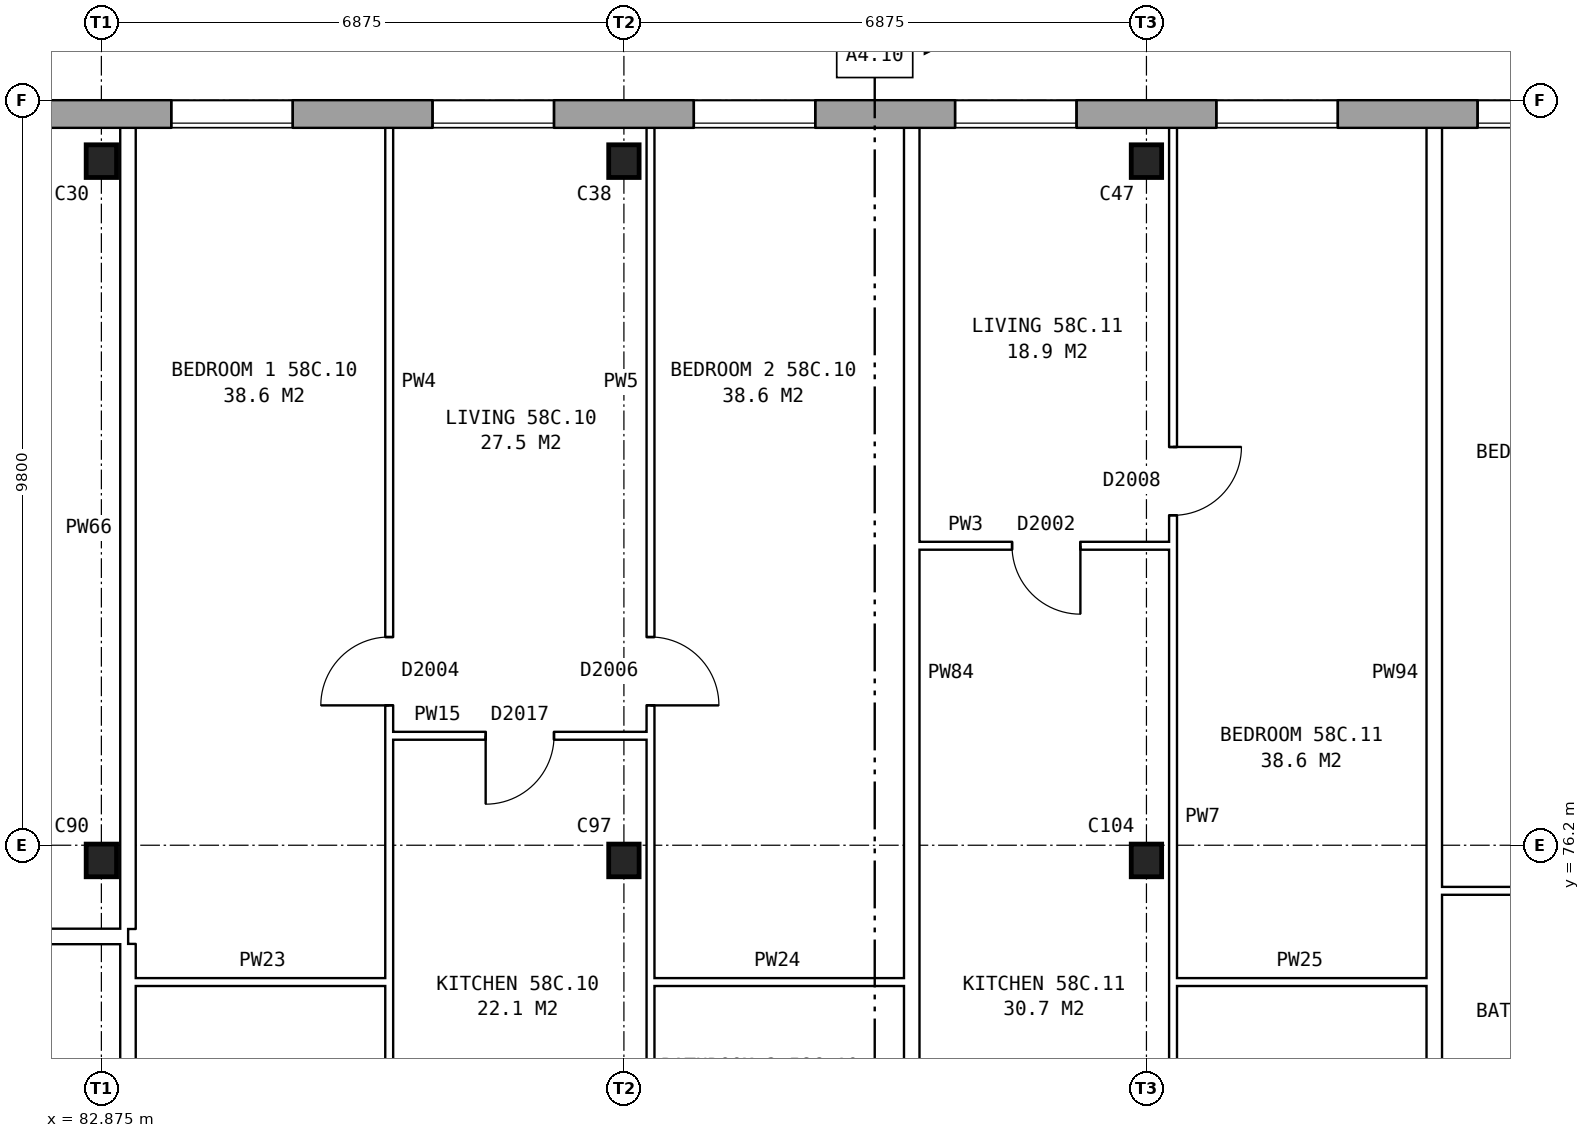
"""IFC4 building model, lengths in metres.
Left out: names, types, materials, properties, quantities, classifications, styles, units other than length and angle.
Written with IfcOpenShell. Run it as: python <this file> out.ifc"""

import sys

from ifc_helpers import new_model, si_unit, direction, frame, frame_2d, origin, origin_2d, place, context, subcontext, project, spatial, rectangle, i_section, extrude, element, fill, save


model = new_model("IFC4")
c1 = context("Model", 3, precision=1e-05, world=origin(), true_north=direction((0.0, 1.0)))
c2 = subcontext(c1, "Body", "Model", "MODEL_VIEW")
j1 = project(units=[si_unit("LENGTHUNIT", "METRE"), si_unit("PLANEANGLEUNIT", "RADIAN")], contexts=[c1])
p1 = place(None, origin())
s1 = spatial("IfcSite", under=j1, at=p1, CompositionType="ELEMENT")
p2 = place(p1, origin())
s2 = spatial("IfcBuilding", under=s1, at=p2, CompositionType="ELEMENT")
p3 = place(p2, frame((0.0, 0.0, 205.9)))
s3 = spatial("IfcBuildingStorey", under=s2, at=p3, CompositionType="ELEMENT", Elevation=205.9)
for number, where, z_axis, x_axis in (
    (1, (82.875, 76.0, 0.0), (0.0, 0.0, 1.0), (1.0, 0.0, 0.0)),
    (2, (89.75, 76.0, 0.0), (0.0, 0.0, 1.0), (1.0, 0.0, 0.0)),
    (3, (96.625, 76.0, 0.0), (0.0, 0.0, 1.0), (1.0, 0.0, 0.0)),
    (4, (82.875, 85.2, 0.0), (0.0, 0.0, 1.0), (1.0, 0.0, 0.0)),
    (5, (89.75, 85.2, 0.0), (0.0, 0.0, 1.0), (1.0, 0.0, 0.0)),
    (6, (96.625, 85.2, 0.0), (0.0, 0.0, 1.0), (1.0, 0.0, 0.0)),
):
    element("IfcColumn", number, at=place(p3, frame(where, z_axis=z_axis, x_axis=x_axis)), inside=s3, PredefinedType="COLUMN", context=c2, shape_type="SweptSolid", body=[
        extrude(i_section(OverallWidth=0.4, OverallDepth=0.43, WebThickness=0.04, FlangeThickness=0.04, at=origin_2d()), origin(), (0.0, 0.0, 1.0), 2.85),
    ])
p4 = place(p3, frame((131.05, 85.82, 0.0), z_axis=(0.0, 0.0, 1.0), x_axis=(-1.0, 0.0, 0.0)))
e7 = element("IfcWall", 7, at=p4, inside=s3, PredefinedType="STANDARD", context=c2, shape_type="SweptSolid", body=[
    extrude(rectangle(XDim=55.1, YDim=0.36, at=frame_2d((27.55, 0.0))), origin(), (0.0, 0.0, 1.0), 2.85),
])
p5 = place(p4, frame((0.969, 0.0, 0.8)))
e8 = element("IfcOpeningElement", 8, at=p5, cuts=e7, PredefinedType="OPENING", context=c2, shape_type="SweptSolid", body=[
    extrude(rectangle(XDim=1.6, YDim=1.8, at=frame_2d((0.8, 0.9))), frame((0.0, 0.19, 0.0), z_axis=(0.0, -1.0, 0.0), x_axis=(1.0, 0.0, 0.0)), (0.0, 0.0, 1.0), 0.38),
])
p6 = place(p4, frame((4.406, 0.0, 0.8)))
e9 = element("IfcOpeningElement", 9, at=p6, cuts=e7, PredefinedType="OPENING", context=c2, shape_type="SweptSolid", body=[
    extrude(rectangle(XDim=1.6, YDim=1.8, at=frame_2d((0.8, 0.9))), frame((0.0, 0.19, 0.0), z_axis=(0.0, -1.0, 0.0), x_axis=(1.0, 0.0, 0.0)), (0.0, 0.0, 1.0), 0.38),
])
p7 = place(p4, frame((7.844, 0.0, 0.8)))
e10 = element("IfcOpeningElement", 10, at=p7, cuts=e7, PredefinedType="OPENING", context=c2, shape_type="SweptSolid", body=[
    extrude(rectangle(XDim=1.6, YDim=1.8, at=frame_2d((0.8, 0.9))), frame((0.0, 0.19, 0.0), z_axis=(0.0, -1.0, 0.0), x_axis=(1.0, 0.0, 0.0)), (0.0, 0.0, 1.0), 0.38),
])
p8 = place(p4, frame((11.281, 0.0, 0.8)))
e11 = element("IfcOpeningElement", 11, at=p8, cuts=e7, PredefinedType="OPENING", context=c2, shape_type="SweptSolid", body=[
    extrude(rectangle(XDim=1.6, YDim=1.8, at=frame_2d((0.8, 0.9))), frame((0.0, 0.19, 0.0), z_axis=(0.0, -1.0, 0.0), x_axis=(1.0, 0.0, 0.0)), (0.0, 0.0, 1.0), 0.38),
])
p9 = place(p4, frame((14.719, 0.0, 0.8)))
e12 = element("IfcOpeningElement", 12, at=p9, cuts=e7, PredefinedType="OPENING", context=c2, shape_type="SweptSolid", body=[
    extrude(rectangle(XDim=1.6, YDim=1.8, at=frame_2d((0.8, 0.9))), frame((0.0, 0.19, 0.0), z_axis=(0.0, -1.0, 0.0), x_axis=(1.0, 0.0, 0.0)), (0.0, 0.0, 1.0), 0.38),
])
p10 = place(p4, frame((18.156, 0.0, 0.8)))
e13 = element("IfcOpeningElement", 13, at=p10, cuts=e7, PredefinedType="OPENING", context=c2, shape_type="SweptSolid", body=[
    extrude(rectangle(XDim=1.6, YDim=1.8, at=frame_2d((0.8, 0.9))), frame((0.0, 0.19, 0.0), z_axis=(0.0, -1.0, 0.0), x_axis=(1.0, 0.0, 0.0)), (0.0, 0.0, 1.0), 0.38),
])
p11 = place(p4, frame((21.594, 0.0, 0.8)))
e14 = element("IfcOpeningElement", 14, at=p11, cuts=e7, PredefinedType="OPENING", context=c2, shape_type="SweptSolid", body=[
    extrude(rectangle(XDim=1.6, YDim=1.8, at=frame_2d((0.8, 0.9))), frame((0.0, 0.19, 0.0), z_axis=(0.0, -1.0, 0.0), x_axis=(1.0, 0.0, 0.0)), (0.0, 0.0, 1.0), 0.38),
])
p12 = place(p4, frame((25.031, 0.0, 0.8)))
e15 = element("IfcOpeningElement", 15, at=p12, cuts=e7, PredefinedType="OPENING", context=c2, shape_type="SweptSolid", body=[
    extrude(rectangle(XDim=1.6, YDim=1.8, at=frame_2d((0.8, 0.9))), frame((0.0, 0.19, 0.0), z_axis=(0.0, -1.0, 0.0), x_axis=(1.0, 0.0, 0.0)), (0.0, 0.0, 1.0), 0.38),
])
p13 = place(p4, frame((28.469, 0.0, 0.8)))
e16 = element("IfcOpeningElement", 16, at=p13, cuts=e7, PredefinedType="OPENING", context=c2, shape_type="SweptSolid", body=[
    extrude(rectangle(XDim=1.6, YDim=1.8, at=frame_2d((0.8, 0.9))), frame((0.0, 0.19, 0.0), z_axis=(0.0, -1.0, 0.0), x_axis=(1.0, 0.0, 0.0)), (0.0, 0.0, 1.0), 0.38),
])
p14 = place(p4, frame((31.906, 0.0, 0.8)))
e17 = element("IfcOpeningElement", 17, at=p14, cuts=e7, PredefinedType="OPENING", context=c2, shape_type="SweptSolid", body=[
    extrude(rectangle(XDim=1.6, YDim=1.8, at=frame_2d((0.8, 0.9))), frame((0.0, 0.19, 0.0), z_axis=(0.0, -1.0, 0.0), x_axis=(1.0, 0.0, 0.0)), (0.0, 0.0, 1.0), 0.38),
])
p15 = place(p4, frame((35.344, 0.0, 0.8)))
e18 = element("IfcOpeningElement", 18, at=p15, cuts=e7, PredefinedType="OPENING", context=c2, shape_type="SweptSolid", body=[
    extrude(rectangle(XDim=1.6, YDim=1.8, at=frame_2d((0.8, 0.9))), frame((0.0, 0.19, 0.0), z_axis=(0.0, -1.0, 0.0), x_axis=(1.0, 0.0, 0.0)), (0.0, 0.0, 1.0), 0.38),
])
p16 = place(p4, frame((38.781, 0.0, 0.8)))
e19 = element("IfcOpeningElement", 19, at=p16, cuts=e7, PredefinedType="OPENING", context=c2, shape_type="SweptSolid", body=[
    extrude(rectangle(XDim=1.6, YDim=1.8, at=frame_2d((0.8, 0.9))), frame((0.0, 0.19, 0.0), z_axis=(0.0, -1.0, 0.0), x_axis=(1.0, 0.0, 0.0)), (0.0, 0.0, 1.0), 0.38),
])
p17 = place(p4, frame((42.219, 0.0, 0.8)))
e20 = element("IfcOpeningElement", 20, at=p17, cuts=e7, PredefinedType="OPENING", context=c2, shape_type="SweptSolid", body=[
    extrude(rectangle(XDim=1.6, YDim=1.8, at=frame_2d((0.8, 0.9))), frame((0.0, 0.19, 0.0), z_axis=(0.0, -1.0, 0.0), x_axis=(1.0, 0.0, 0.0)), (0.0, 0.0, 1.0), 0.38),
])
p18 = place(p4, frame((45.656, 0.0, 0.8)))
e21 = element("IfcOpeningElement", 21, at=p18, cuts=e7, PredefinedType="OPENING", context=c2, shape_type="SweptSolid", body=[
    extrude(rectangle(XDim=1.6, YDim=1.8, at=frame_2d((0.8, 0.9))), frame((0.0, 0.19, 0.0), z_axis=(0.0, -1.0, 0.0), x_axis=(1.0, 0.0, 0.0)), (0.0, 0.0, 1.0), 0.38),
])
p19 = place(p4, frame((49.094, 0.0, 0.8)))
e22 = element("IfcOpeningElement", 22, at=p19, cuts=e7, PredefinedType="OPENING", context=c2, shape_type="SweptSolid", body=[
    extrude(rectangle(XDim=1.6, YDim=1.8, at=frame_2d((0.8, 0.9))), frame((0.0, 0.19, 0.0), z_axis=(0.0, -1.0, 0.0), x_axis=(1.0, 0.0, 0.0)), (0.0, 0.0, 1.0), 0.38),
])
p20 = place(p4, frame((52.531, 0.0, 0.8)))
e23 = element("IfcOpeningElement", 23, at=p20, cuts=e7, PredefinedType="OPENING", context=c2, shape_type="SweptSolid", body=[
    extrude(rectangle(XDim=1.6, YDim=1.8, at=frame_2d((0.8, 0.9))), frame((0.0, 0.19, 0.0), z_axis=(0.0, -1.0, 0.0), x_axis=(1.0, 0.0, 0.0)), (0.0, 0.0, 1.0), 0.38),
])
p21 = place(p3, frame((83.325, 74.4, 0.0), z_axis=(0.0, 0.0, 1.0), x_axis=(1.0, 0.0, 0.0)))
e24 = element("IfcWall", 24, at=p21, inside=s3, PredefinedType="PARTITIONING", context=c2, shape_type="SweptSolid", body=[
    extrude(rectangle(XDim=3.337, YDim=0.1, at=frame_2d((1.668, 0.0))), origin(), (0.0, 0.0, 1.0), 2.85),
])
for number, where, z_axis, x_axis in (
    (25, (90.1, 74.4, 0.0), (0.0, 0.0, 1.0), (1.0, 0.0, 0.0)),
    (26, (96.975, 74.4, 0.0), (0.0, 0.0, 1.0), (1.0, 0.0, 0.0)),
):
    element("IfcWall", number, at=place(p3, frame(where, z_axis=z_axis, x_axis=x_axis)), inside=s3, PredefinedType="PARTITIONING", context=c2, shape_type="SweptSolid", body=[
        extrude(rectangle(XDim=3.337, YDim=0.1, at=frame_2d((1.668, 0.0))), origin(), (0.0, 0.0, 1.0), 2.85),
    ])
p22 = place(p3, frame((75.64, 75.0, 0.0), z_axis=(0.0, 0.0, 1.0), x_axis=(1.0, 0.0, 0.0)))
e27 = element("IfcWall", 27, at=p22, inside=s3, PredefinedType="PARTITIONING", context=c2, shape_type="SweptSolid", body=[
    extrude(rectangle(XDim=7.585, YDim=0.2, at=frame_2d((3.792, 0.0))), origin(), (0.0, 0.0, 1.0), 2.85),
])
p23 = place(p22, frame((3.343, 0.0, 0.0)))
e28 = element("IfcOpeningElement", 28, at=p23, cuts=e27, PredefinedType="OPENING", context=c2, shape_type="SweptSolid", body=[
    extrude(rectangle(XDim=0.9, YDim=2.1, at=frame_2d((0.45, 1.05))), frame((0.0, 0.11, 0.0), z_axis=(0.0, -1.0, 0.0), x_axis=(1.0, 0.0, 0.0)), (0.0, 0.0, 1.0), 0.22),
])
p24 = place(p3, frame((100.512, 75.6, 0.0), z_axis=(0.0, 0.0, 1.0), x_axis=(1.0, 0.0, 0.0)))
e29 = element("IfcWall", 29, at=p24, inside=s3, PredefinedType="PARTITIONING", context=c2, shape_type="SweptSolid", body=[
    extrude(rectangle(XDim=3.338, YDim=0.1, at=frame_2d((1.669, 0.0))), origin(), (0.0, 0.0, 1.0), 2.85),
])
p25 = place(p3, frame((86.662, 77.64, 0.0), z_axis=(0.0, 0.0, 1.0), x_axis=(1.0, 0.0, 0.0)))
e30 = element("IfcWall", 30, at=p25, inside=s3, PredefinedType="PARTITIONING", context=c2, shape_type="SweptSolid", body=[
    extrude(rectangle(XDim=3.438, YDim=0.1, at=frame_2d((1.719, 0.0))), origin(), (0.0, 0.0, 1.0), 2.85),
])
p26 = place(p25, frame((1.269, 0.0, 0.0)))
e31 = element("IfcOpeningElement", 31, at=p26, cuts=e30, PredefinedType="OPENING", context=c2, shape_type="SweptSolid", body=[
    extrude(rectangle(XDim=0.9, YDim=2.1, at=frame_2d((0.45, 1.05))), frame((0.0, 0.06, 0.0), z_axis=(0.0, -1.0, 0.0), x_axis=(1.0, 0.0, 0.0)), (0.0, 0.0, 1.0), 0.12),
])
p27 = place(p3, frame((93.637, 80.14, 0.0), z_axis=(0.0, 0.0, 1.0), x_axis=(1.0, 0.0, 0.0)))
e32 = element("IfcWall", 32, at=p27, inside=s3, PredefinedType="PARTITIONING", context=c2, shape_type="SweptSolid", body=[
    extrude(rectangle(XDim=3.338, YDim=0.1, at=frame_2d((1.669, 0.0))), origin(), (0.0, 0.0, 1.0), 2.85),
])
p28 = place(p27, frame((1.219, 0.0, 0.0)))
e33 = element("IfcOpeningElement", 33, at=p28, cuts=e32, PredefinedType="OPENING", context=c2, shape_type="SweptSolid", body=[
    extrude(rectangle(XDim=0.9, YDim=2.1, at=frame_2d((0.45, 1.05))), frame((0.0, 0.06, 0.0), z_axis=(0.0, -1.0, 0.0), x_axis=(1.0, 0.0, 0.0)), (0.0, 0.0, 1.0), 0.12),
])
p29 = place(p3, frame((83.225, 71.3, 0.0), z_axis=(0.0, 0.0, 1.0), x_axis=(0.0, 1.0, 0.0)))
e34 = element("IfcWall", 34, at=p29, inside=s3, PredefinedType="PARTITIONING", context=c2, shape_type="SweptSolid", body=[
    extrude(rectangle(XDim=3.6, YDim=0.2, at=frame_2d((1.8, 0.0))), origin(), (0.0, 0.0, 1.0), 2.85),
])
p30 = place(p3, frame((83.225, 75.1, 0.0), z_axis=(0.0, 0.0, 1.0), x_axis=(0.0, 1.0, 0.0)))
e35 = element("IfcWall", 35, at=p30, inside=s3, PredefinedType="PARTITIONING", context=c2, shape_type="SweptSolid", body=[
    extrude(rectangle(XDim=10.54, YDim=0.2, at=frame_2d((5.27, 0.0))), origin(), (0.0, 0.0, 1.0), 2.85),
])
p31 = place(p3, frame((86.662, 71.3, 0.0), z_axis=(0.0, 0.0, 1.0), x_axis=(0.0, 1.0, 0.0)))
e36 = element("IfcWall", 36, at=p31, inside=s3, PredefinedType="PARTITIONING", context=c2, shape_type="SweptSolid", body=[
    extrude(rectangle(XDim=14.34, YDim=0.1, at=frame_2d((7.17, 0.0))), origin(), (0.0, 0.0, 1.0), 2.85),
])
p32 = place(p31, frame((6.74, 0.0, 0.0)))
e37 = element("IfcOpeningElement", 37, at=p32, cuts=e36, PredefinedType="OPENING", context=c2, shape_type="SweptSolid", body=[
    extrude(rectangle(XDim=0.9, YDim=2.1, at=frame_2d((0.45, 1.05))), frame((0.0, 0.06, 0.0), z_axis=(0.0, -1.0, 0.0), x_axis=(1.0, 0.0, 0.0)), (0.0, 0.0, 1.0), 0.12),
])
p33 = place(p31, frame((0.4, 0.0, 0.0)))
e38 = element("IfcOpeningElement", 38, at=p33, cuts=e36, PredefinedType="OPENING", context=c2, shape_type="SweptSolid", body=[
    extrude(rectangle(XDim=0.9, YDim=2.1, at=frame_2d((0.45, 1.05))), frame((0.0, 0.06, 0.0), z_axis=(0.0, -1.0, 0.0), x_axis=(1.0, 0.0, 0.0)), (0.0, 0.0, 1.0), 0.12),
])
p34 = place(p3, frame((90.1, 71.3, 0.0), z_axis=(0.0, 0.0, 1.0), x_axis=(0.0, 1.0, 0.0)))
e39 = element("IfcWall", 39, at=p34, inside=s3, PredefinedType="PARTITIONING", context=c2, shape_type="SweptSolid", body=[
    extrude(rectangle(XDim=14.34, YDim=0.1, at=frame_2d((7.17, 0.0))), origin(), (0.0, 0.0, 1.0), 2.85),
])
p35 = place(p34, frame((6.74, 0.0, 0.0)))
e40 = element("IfcOpeningElement", 40, at=p35, cuts=e39, PredefinedType="OPENING", context=c2, shape_type="SweptSolid", body=[
    extrude(rectangle(XDim=0.9, YDim=2.1, at=frame_2d((0.45, 1.05))), frame((0.0, 0.06, 0.0), z_axis=(0.0, -1.0, 0.0), x_axis=(1.0, 0.0, 0.0)), (0.0, 0.0, 1.0), 0.12),
])
p36 = place(p34, frame((0.4, 0.0, 0.0)))
e41 = element("IfcOpeningElement", 41, at=p36, cuts=e39, PredefinedType="OPENING", context=c2, shape_type="SweptSolid", body=[
    extrude(rectangle(XDim=0.9, YDim=2.1, at=frame_2d((0.45, 1.05))), frame((0.0, 0.06, 0.0), z_axis=(0.0, -1.0, 0.0), x_axis=(1.0, 0.0, 0.0)), (0.0, 0.0, 1.0), 0.12),
])
p37 = place(p3, frame((93.537, 71.3, 0.0), z_axis=(0.0, 0.0, 1.0), x_axis=(0.0, 1.0, 0.0)))
e42 = element("IfcWall", 42, at=p37, inside=s3, PredefinedType="PARTITIONING", context=c2, shape_type="SweptSolid", body=[
    extrude(rectangle(XDim=14.34, YDim=0.2, at=frame_2d((7.17, 0.0))), origin(), (0.0, 0.0, 1.0), 2.85),
])
p38 = place(p3, frame((96.975, 71.3, 0.0), z_axis=(0.0, 0.0, 1.0), x_axis=(0.0, 1.0, 0.0)))
e43 = element("IfcWall", 43, at=p38, inside=s3, PredefinedType="PARTITIONING", context=c2, shape_type="SweptSolid", body=[
    extrude(rectangle(XDim=14.34, YDim=0.1, at=frame_2d((7.17, 0.0))), origin(), (0.0, 0.0, 1.0), 2.85),
])
p39 = place(p38, frame((9.24, 0.0, 0.0)))
e44 = element("IfcOpeningElement", 44, at=p39, cuts=e43, PredefinedType="OPENING", context=c2, shape_type="SweptSolid", body=[
    extrude(rectangle(XDim=0.9, YDim=2.1, at=frame_2d((0.45, 1.05))), frame((0.0, 0.06, 0.0), z_axis=(0.0, -1.0, 0.0), x_axis=(1.0, 0.0, 0.0)), (0.0, 0.0, 1.0), 0.12),
])
p40 = place(p38, frame((0.4, 0.0, 0.0)))
e45 = element("IfcOpeningElement", 45, at=p40, cuts=e43, PredefinedType="OPENING", context=c2, shape_type="SweptSolid", body=[
    extrude(rectangle(XDim=0.9, YDim=2.1, at=frame_2d((0.45, 1.05))), frame((0.0, 0.06, 0.0), z_axis=(0.0, -1.0, 0.0), x_axis=(1.0, 0.0, 0.0)), (0.0, 0.0, 1.0), 0.12),
])
p41 = place(p3, frame((100.412, 71.3, 0.0), z_axis=(0.0, 0.0, 1.0), x_axis=(0.0, 1.0, 0.0)))
e46 = element("IfcWall", 46, at=p41, inside=s3, PredefinedType="PARTITIONING", context=c2, shape_type="SweptSolid", body=[
    extrude(rectangle(XDim=14.34, YDim=0.2, at=frame_2d((7.17, 0.0))), origin(), (0.0, 0.0, 1.0), 2.85),
])
p42 = place(p13, origin())
e47 = element("IfcWindow", 47, at=p42, inside=s3, PartitioningType="SINGLE_PANEL", PredefinedType="WINDOW", context=c2, shape_type="SweptSolid", body=[
    extrude(rectangle(XDim=1.6, YDim=1.8, at=frame_2d((0.8, 0.9))), frame((0.0, 0.15, 0.0), z_axis=(0.0, -1.0, 0.0), x_axis=(1.0, 0.0, 0.0)), (0.0, 0.0, 1.0), 0.06),
])
fill(e16, e47)
p43 = place(p14, origin())
e48 = element("IfcWindow", 48, at=p43, inside=s3, PartitioningType="SINGLE_PANEL", PredefinedType="WINDOW", context=c2, shape_type="SweptSolid", body=[
    extrude(rectangle(XDim=1.6, YDim=1.8, at=frame_2d((0.8, 0.9))), frame((0.0, 0.15, 0.0), z_axis=(0.0, -1.0, 0.0), x_axis=(1.0, 0.0, 0.0)), (0.0, 0.0, 1.0), 0.06),
])
fill(e17, e48)
p44 = place(p15, origin())
e49 = element("IfcWindow", 49, at=p44, inside=s3, PartitioningType="SINGLE_PANEL", PredefinedType="WINDOW", context=c2, shape_type="SweptSolid", body=[
    extrude(rectangle(XDim=1.6, YDim=1.8, at=frame_2d((0.8, 0.9))), frame((0.0, 0.15, 0.0), z_axis=(0.0, -1.0, 0.0), x_axis=(1.0, 0.0, 0.0)), (0.0, 0.0, 1.0), 0.06),
])
fill(e18, e49)
p45 = place(p16, origin())
e50 = element("IfcWindow", 50, at=p45, inside=s3, PartitioningType="SINGLE_PANEL", PredefinedType="WINDOW", context=c2, shape_type="SweptSolid", body=[
    extrude(rectangle(XDim=1.6, YDim=1.8, at=frame_2d((0.8, 0.9))), frame((0.0, 0.15, 0.0), z_axis=(0.0, -1.0, 0.0), x_axis=(1.0, 0.0, 0.0)), (0.0, 0.0, 1.0), 0.06),
])
fill(e19, e50)
p46 = place(p17, origin())
e51 = element("IfcWindow", 51, at=p46, inside=s3, PartitioningType="SINGLE_PANEL", PredefinedType="WINDOW", context=c2, shape_type="SweptSolid", body=[
    extrude(rectangle(XDim=1.6, YDim=1.8, at=frame_2d((0.8, 0.9))), frame((0.0, 0.15, 0.0), z_axis=(0.0, -1.0, 0.0), x_axis=(1.0, 0.0, 0.0)), (0.0, 0.0, 1.0), 0.06),
])
fill(e20, e51)
p47 = place(p18, origin())
e52 = element("IfcWindow", 52, at=p47, inside=s3, PartitioningType="SINGLE_PANEL", PredefinedType="WINDOW", context=c2, shape_type="SweptSolid", body=[
    extrude(rectangle(XDim=1.6, YDim=1.8, at=frame_2d((0.8, 0.9))), frame((0.0, 0.15, 0.0), z_axis=(0.0, -1.0, 0.0), x_axis=(1.0, 0.0, 0.0)), (0.0, 0.0, 1.0), 0.06),
])
fill(e21, e52)
p48 = place(p32, origin())
e53 = element("IfcDoor", 53, at=p48, inside=s3, OperationType="SINGLE_SWING_LEFT", PredefinedType="DOOR", context=c2, shape_type="SweptSolid", body=[
    extrude(rectangle(XDim=0.9, YDim=2.1, at=frame_2d((0.45, 1.05))), frame((0.0, 0.025, 0.0), z_axis=(0.0, -1.0, 0.0), x_axis=(1.0, 0.0, 0.0)), (0.0, 0.0, 1.0), 0.05),
])
fill(e37, e53)
p49 = place(p35, frame((0.9, 0.0, 0.0), z_axis=(0.0, 0.0, 1.0), x_axis=(-1.0, 0.0, 0.0)))
e54 = element("IfcDoor", 54, at=p49, inside=s3, OperationType="SINGLE_SWING_RIGHT", PredefinedType="DOOR", context=c2, shape_type="SweptSolid", body=[
    extrude(rectangle(XDim=0.9, YDim=2.1, at=frame_2d((0.45, 1.05))), frame((0.0, 0.025, 0.0), z_axis=(0.0, -1.0, 0.0), x_axis=(1.0, 0.0, 0.0)), (0.0, 0.0, 1.0), 0.05),
])
fill(e40, e54)
p50 = place(p26, frame((0.9, 0.0, 0.0), z_axis=(0.0, 0.0, 1.0), x_axis=(-1.0, 0.0, 0.0)))
e55 = element("IfcDoor", 55, at=p50, inside=s3, OperationType="SINGLE_SWING_RIGHT", PredefinedType="DOOR", context=c2, shape_type="SweptSolid", body=[
    extrude(rectangle(XDim=0.9, YDim=2.1, at=frame_2d((0.45, 1.05))), frame((0.0, 0.025, 0.0), z_axis=(0.0, -1.0, 0.0), x_axis=(1.0, 0.0, 0.0)), (0.0, 0.0, 1.0), 0.05),
])
fill(e31, e55)
p51 = place(p39, frame((0.9, 0.0, 0.0), z_axis=(0.0, 0.0, 1.0), x_axis=(-1.0, 0.0, 0.0)))
e56 = element("IfcDoor", 56, at=p51, inside=s3, OperationType="SINGLE_SWING_LEFT", PredefinedType="DOOR", context=c2, shape_type="SweptSolid", body=[
    extrude(rectangle(XDim=0.9, YDim=2.1, at=frame_2d((0.45, 1.05))), frame((0.0, 0.025, 0.0), z_axis=(0.0, -1.0, 0.0), x_axis=(1.0, 0.0, 0.0)), (0.0, 0.0, 1.0), 0.05),
])
fill(e44, e56)
p52 = place(p28, frame((0.9, 0.0, 0.0), z_axis=(0.0, 0.0, 1.0), x_axis=(-1.0, 0.0, 0.0)))
e57 = element("IfcDoor", 57, at=p52, inside=s3, OperationType="SINGLE_SWING_LEFT", PredefinedType="DOOR", context=c2, shape_type="SweptSolid", body=[
    extrude(rectangle(XDim=0.9, YDim=2.1, at=frame_2d((0.45, 1.05))), frame((0.0, 0.025, 0.0), z_axis=(0.0, -1.0, 0.0), x_axis=(1.0, 0.0, 0.0)), (0.0, 0.0, 1.0), 0.05),
])
fill(e33, e57)
save(model, sys.argv[1])
